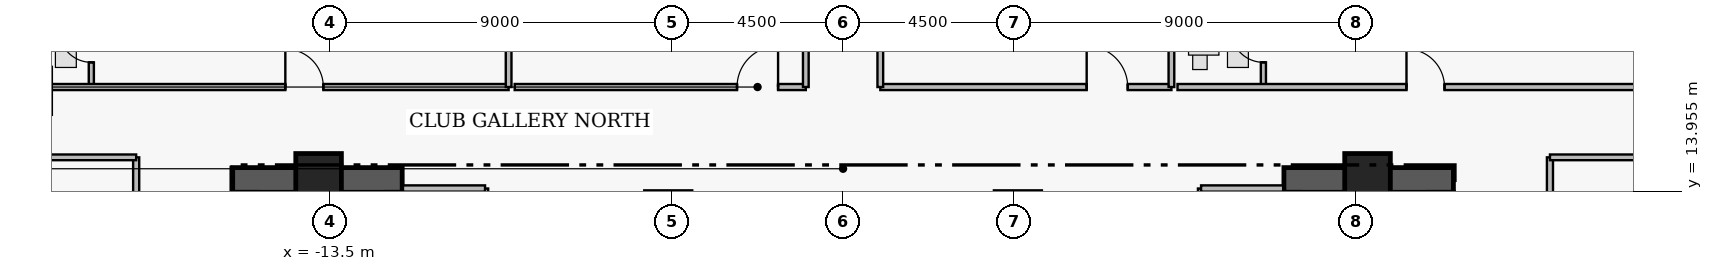
"""IFC4 building model, lengths in metres.
Left out: names, types, materials, properties, quantities, classifications, styles, units other than length and angle.
Written with IfcOpenShell. Run it as: python <this file> out.ifc"""

import sys

from ifc_helpers import new_model, si_unit, direction, frame, frame_2d, origin, origin_2d, place, context, subcontext, project, spatial, rectangle, extrude, element, fill, save


model = new_model("IFC4")
c1 = context("Model", 3, precision=1e-05, world=origin(), true_north=direction((0.0, 1.0)))
c2 = subcontext(c1, "Body", "Model", "MODEL_VIEW")
j1 = project(units=[si_unit("LENGTHUNIT", "METRE"), si_unit("PLANEANGLEUNIT", "RADIAN")], contexts=[c1])
p1 = place(None, origin())
s1 = spatial("IfcSite", under=j1, at=p1, CompositionType="ELEMENT")
p2 = place(p1, origin())
s2 = spatial("IfcBuilding", under=s1, at=p2, CompositionType="ELEMENT")
p3 = place(p2, frame((0.0, 0.0, 226.15)))
s3 = spatial("IfcBuildingStorey", under=s2, at=p3, CompositionType="ELEMENT", Elevation=226.15)
for number, where, z_axis, x_axis in (
    (1, (-16.06, 14.255, 0.0), (0.0, 0.0, 1.0), (1.0, 0.0, 0.0)),
    (2, (11.6, 14.255, 0.0), (0.0, 0.0, 1.0), (1.0, 0.0, 0.0)),
):
    element("IfcWall", number, at=place(p3, frame(where, z_axis=z_axis, x_axis=x_axis)), inside=s3, PredefinedType="SHEAR", context=c2, shape_type="SweptSolid", body=[
        extrude(rectangle(XDim=4.46, YDim=0.65, at=frame_2d((2.23, 0.0))), origin(), (0.0, 0.0, 1.0), 3.56),
    ])
for number, where, z_axis, x_axis in (
    (3, (-13.8, 14.35, 0.0), (0.0, 0.0, 1.0), (1.0, 0.0, 0.0)),
    (4, (-4.6, 13.35, 0.0), (0.0, 0.0, 1.0), (1.0, 0.0, 0.0)),
    (5, (4.6, 13.35, 0.0), (0.0, 0.0, 1.0), (1.0, 0.0, 0.0)),
    (6, (13.8, 14.35, 0.0), (0.0, 0.0, 1.0), (1.0, 0.0, 0.0)),
):
    element("IfcColumn", number, at=place(p3, frame(where, z_axis=z_axis, x_axis=x_axis)), inside=s3, PredefinedType="COLUMN", context=c2, shape_type="SweptSolid", body=[
        extrude(rectangle(XDim=1.2, YDim=1.2, at=origin_2d()), origin(), (0.0, 0.0, 1.0), 3.75),
    ])
p4 = place(p3, frame((-19.78, 16.7, 0.0), z_axis=(0.0, 0.0, 1.0), x_axis=(0.0, 1.0, 0.0)))
e7 = element("IfcWall", 7, at=p4, inside=s3, PredefinedType="PLUMBINGWALL", context=c2, shape_type="SweptSolid", body=[
    extrude(rectangle(XDim=2.36, YDim=0.135, at=frame_2d((1.18, 0.0))), origin(), (0.0, 0.0, 1.0), 3.53),
])
p5 = place(p4, frame((0.65, 0.0, 0.0)))
e8 = element("IfcOpeningElement", 8, at=p5, cuts=e7, PredefinedType="OPENING", context=c2, shape_type="SweptSolid", body=[
    extrude(rectangle(XDim=0.85, YDim=2.1, at=frame_2d((0.425, 1.05))), frame((0.0, 0.077, 0.0), z_axis=(0.0, -1.0, 0.0), x_axis=(1.0, 0.0, 0.0)), (0.0, 0.0, 1.0), 0.155),
])
p6 = place(p3, frame((-22.04, 16.7, 0.0), z_axis=(0.0, 0.0, 1.0), x_axis=(1.0, 0.0, 0.0)))
e9 = element("IfcWall", 9, at=p6, inside=s3, PredefinedType="PARTITIONING", context=c2, shape_type="SweptSolid", body=[
    extrude(rectangle(XDim=13.24, YDim=0.16, at=frame_2d((6.62, 0.0))), origin(), (0.0, 0.0, 1.0), 3.124),
])
p7 = place(p6, frame((7.365, 0.0, 0.0)))
e10 = element("IfcOpeningElement", 10, at=p7, cuts=e9, PredefinedType="OPENING", context=c2, shape_type="SweptSolid", body=[
    extrude(rectangle(XDim=1.0, YDim=2.15, at=frame_2d((0.5, 1.075))), frame((0.0, 0.09, 0.0), z_axis=(0.0, -1.0, 0.0), x_axis=(1.0, 0.0, 0.0)), (0.0, 0.0, 1.0), 0.18),
])
p8 = place(p3, frame((-8.64, 16.7, 0.0), z_axis=(0.0, 0.0, 1.0), x_axis=(1.0, 0.0, 0.0)))
e11 = element("IfcWall", 11, at=p8, inside=s3, PredefinedType="PARTITIONING", context=c2, shape_type="SweptSolid", body=[
    extrude(rectangle(XDim=7.66, YDim=0.16, at=frame_2d((3.83, 0.0))), origin(), (0.0, 0.0, 1.0), 3.124),
])
p9 = place(p8, frame((5.85, 0.0, 0.0)))
e12 = element("IfcOpeningElement", 12, at=p9, cuts=e11, PredefinedType="OPENING", context=c2, shape_type="SweptSolid", body=[
    extrude(rectangle(XDim=1.08, YDim=2.18, at=frame_2d((0.54, 1.09))), frame((0.0, 0.09, 0.0), z_axis=(0.0, -1.0, 0.0), x_axis=(1.0, 0.0, 0.0)), (0.0, 0.0, 1.0), 0.18),
])
p10 = place(p3, frame((0.98, 16.7, 0.0), z_axis=(0.0, 0.0, 1.0), x_axis=(1.0, 0.0, 0.0)))
e13 = element("IfcWall", 13, at=p10, inside=s3, PredefinedType="PARTITIONING", context=c2, shape_type="SweptSolid", body=[
    extrude(rectangle(XDim=7.66, YDim=0.16, at=frame_2d((3.83, 0.0))), origin(), (0.0, 0.0, 1.0), 3.124),
])
p11 = place(p10, frame((5.43, 0.0, 0.0)))
e14 = element("IfcOpeningElement", 14, at=p11, cuts=e13, PredefinedType="OPENING", context=c2, shape_type="SweptSolid", body=[
    extrude(rectangle(XDim=1.08, YDim=2.18, at=frame_2d((0.54, 1.09))), frame((0.0, 0.09, 0.0), z_axis=(0.0, -1.0, 0.0), x_axis=(1.0, 0.0, 0.0)), (0.0, 0.0, 1.0), 0.18),
])
p12 = place(p3, frame((11.06, 16.7, 0.0), z_axis=(0.0, 0.0, 1.0), x_axis=(0.0, 1.0, 0.0)))
e15 = element("IfcWall", 15, at=p12, inside=s3, PredefinedType="PLUMBINGWALL", context=c2, shape_type="SweptSolid", body=[
    extrude(rectangle(XDim=2.36, YDim=0.135, at=frame_2d((1.18, 0.0))), origin(), (0.0, 0.0, 1.0), 3.53),
])
p13 = place(p12, frame((0.65, 0.0, 0.0)))
e16 = element("IfcOpeningElement", 16, at=p13, cuts=e15, PredefinedType="OPENING", context=c2, shape_type="SweptSolid", body=[
    extrude(rectangle(XDim=0.85, YDim=2.1, at=frame_2d((0.425, 1.05))), frame((0.0, 0.077, 0.0), z_axis=(0.0, -1.0, 0.0), x_axis=(1.0, 0.0, 0.0)), (0.0, 0.0, 1.0), 0.155),
])
p14 = place(p3, frame((8.8, 16.7, 0.0), z_axis=(0.0, 0.0, 1.0), x_axis=(1.0, 0.0, 0.0)))
e17 = element("IfcWall", 17, at=p14, inside=s3, PredefinedType="PARTITIONING", context=c2, shape_type="SweptSolid", body=[
    extrude(rectangle(XDim=13.24, YDim=0.16, at=frame_2d((6.62, 0.0))), origin(), (0.0, 0.0, 1.0), 3.124),
])
p15 = place(p14, frame((6.025, 0.0, 0.0)))
e18 = element("IfcOpeningElement", 18, at=p15, cuts=e17, PredefinedType="OPENING", context=c2, shape_type="SweptSolid", body=[
    extrude(rectangle(XDim=1.0, YDim=2.15, at=frame_2d((0.5, 1.075))), frame((0.0, 0.09, 0.0), z_axis=(0.0, -1.0, 0.0), x_axis=(1.0, 0.0, 0.0)), (0.0, 0.0, 1.0), 0.18),
])
p16 = place(p3, frame((18.6, 7.96, 0.0), z_axis=(0.0, 0.0, 1.0), x_axis=(0.0, 1.0, 0.0)))
e19 = element("IfcWall", 19, at=p16, inside=s3, PredefinedType="PARTITIONING", context=c2, shape_type="SweptSolid", body=[
    extrude(rectangle(XDim=6.89, YDim=0.16, at=frame_2d((3.445, 0.0))), origin(), (0.0, 0.0, 1.0), 3.53),
])
p17 = place(p16, frame((2.985, 0.0, 0.0)))
e20 = element("IfcOpeningElement", 20, at=p17, cuts=e19, PredefinedType="OPENING", context=c2, shape_type="SweptSolid", body=[
    extrude(rectangle(XDim=0.92, YDim=2.12, at=frame_2d((0.46, 1.06))), frame((0.0, 0.09, 0.0), z_axis=(0.0, -1.0, 0.0), x_axis=(1.0, 0.0, 0.0)), (0.0, 0.0, 1.0), 0.18),
])
p18 = place(p3, frame((-18.6, 10.18, 0.0), z_axis=(0.0, 0.0, 1.0), x_axis=(0.0, 1.0, 0.0)))
e21 = element("IfcWall", 21, at=p18, inside=s3, PredefinedType="PARTITIONING", context=c2, shape_type="SweptSolid", body=[
    extrude(rectangle(XDim=4.67, YDim=0.16, at=frame_2d((2.335, 0.0))), origin(), (0.0, 0.0, 1.0), 3.53),
])
p19 = place(p18, frame((1.86, 0.0, 0.0)))
e22 = element("IfcOpeningElement", 22, at=p19, cuts=e21, PredefinedType="OPENING", context=c2, shape_type="SweptSolid", body=[
    extrude(rectangle(XDim=0.95, YDim=2.15, at=frame_2d((0.475, 1.075))), frame((0.0, 0.09, 0.0), z_axis=(0.0, -1.0, 0.0), x_axis=(1.0, 0.0, 0.0)), (0.0, 0.0, 1.0), 0.18),
])
p20 = place(p3, frame((-9.42, 11.07, 0.0), z_axis=(0.0, 0.0, 1.0), x_axis=(0.0, 1.0, 0.0)))
e23 = element("IfcWall", 23, at=p20, inside=s3, PredefinedType="PARTITIONING", context=c2, shape_type="SweptSolid", body=[
    extrude(rectangle(XDim=2.96, YDim=0.165, at=frame_2d((1.48, 0.0))), origin(), (0.0, 0.0, 1.0), 3.53),
])
p21 = place(p3, frame((-11.58, 14.03, 0.0), z_axis=(0.0, 0.0, 1.0), x_axis=(1.0, 0.0, 0.0)))
e24 = element("IfcWall", 24, at=p21, inside=s3, PredefinedType="PARTITIONING", context=c2, shape_type="SweptSolid", body=[
    extrude(rectangle(XDim=2.16, YDim=0.165, at=frame_2d((1.08, 0.0))), origin(), (0.0, 0.0, 1.0), 3.53),
])
p22 = place(p3, frame((9.42, 11.07, 0.0), z_axis=(0.0, 0.0, 1.0), x_axis=(0.0, 1.0, 0.0)))
e25 = element("IfcWall", 25, at=p22, inside=s3, PredefinedType="PARTITIONING", context=c2, shape_type="SweptSolid", body=[
    extrude(rectangle(XDim=2.96, YDim=0.165, at=frame_2d((1.48, 0.0))), origin(), (0.0, 0.0, 1.0), 3.53),
])
p23 = place(p3, frame((9.42, 14.03, 0.0), z_axis=(0.0, 0.0, 1.0), x_axis=(1.0, 0.0, 0.0)))
e26 = element("IfcWall", 26, at=p23, inside=s3, PredefinedType="PARTITIONING", context=c2, shape_type="SweptSolid", body=[
    extrude(rectangle(XDim=2.16, YDim=0.165, at=frame_2d((1.08, 0.0))), origin(), (0.0, 0.0, 1.0), 3.53),
])
for number, where, z_axis, x_axis in (
    (27, (-8.8, 16.7, 0.0), (0.0, 0.0, 1.0), (0.0, 1.0, 0.0)),
    (28, (-0.98, 16.7, 0.0), (0.0, 0.0, 1.0), (0.0, 1.0, 0.0)),
    (29, (0.98, 16.7, 0.0), (0.0, 0.0, 1.0), (0.0, 1.0, 0.0)),
    (30, (8.64, 16.7, 0.0), (0.0, 0.0, 1.0), (0.0, 1.0, 0.0)),
):
    element("IfcWall", number, at=place(p3, frame(where, z_axis=z_axis, x_axis=x_axis)), inside=s3, PredefinedType="PARTITIONING", context=c2, shape_type="SweptSolid", body=[
        extrude(rectangle(XDim=8.3, YDim=0.15, at=frame_2d((4.15, 0.0))), origin(), (0.0, 0.0, 1.0), 3.53),
    ])
for number, where, z_axis, x_axis in (
    (31, (18.6, 14.85, 0.0), (0.0, 0.0, 1.0), (1.0, 0.0, 0.0)),
    (32, (-23.638, 14.85, 0.0), (0.0, 0.0, 1.0), (1.0, 0.0, 0.0)),
):
    element("IfcWall", number, at=place(p3, frame(where, z_axis=z_axis, x_axis=x_axis)), inside=s3, PredefinedType="PARTITIONING", context=c2, shape_type="SweptSolid", body=[
        extrude(rectangle(XDim=5.038, YDim=0.15, at=frame_2d((2.519, 0.0))), origin(), (0.0, 0.0, 1.0), 3.53),
    ])
p24 = place(p5, origin())
e33 = element("IfcDoor", 33, at=p24, inside=s3, OperationType="SINGLE_SWING_RIGHT", PredefinedType="DOOR", context=c2, shape_type="SweptSolid", body=[
    extrude(rectangle(XDim=0.85, YDim=2.1, at=frame_2d((0.425, 1.05))), frame((0.0, 0.025, 0.0), z_axis=(0.0, -1.0, 0.0), x_axis=(1.0, 0.0, 0.0)), (0.0, 0.0, 1.0), 0.05),
])
fill(e8, e33)
p25 = place(p7, origin())
e34 = element("IfcDoor", 34, at=p25, inside=s3, OperationType="SINGLE_SWING_LEFT", PredefinedType="DOOR", context=c2, shape_type="SweptSolid", body=[
    extrude(rectangle(XDim=1.0, YDim=2.15, at=frame_2d((0.5, 1.075))), frame((0.0, 0.025, 0.0), z_axis=(0.0, -1.0, 0.0), x_axis=(1.0, 0.0, 0.0)), (0.0, 0.0, 1.0), 0.05),
])
fill(e10, e34)
p26 = place(p9, origin())
e35 = element("IfcDoor", 35, at=p26, inside=s3, OperationType="SINGLE_SWING_RIGHT", PredefinedType="DOOR", context=c2, shape_type="SweptSolid", body=[
    extrude(rectangle(XDim=1.08, YDim=2.18, at=frame_2d((0.54, 1.09))), frame((0.0, 0.025, 0.0), z_axis=(0.0, -1.0, 0.0), x_axis=(1.0, 0.0, 0.0)), (0.0, 0.0, 1.0), 0.05),
])
fill(e12, e35)
p27 = place(p11, origin())
e36 = element("IfcDoor", 36, at=p27, inside=s3, OperationType="SINGLE_SWING_LEFT", PredefinedType="DOOR", context=c2, shape_type="SweptSolid", body=[
    extrude(rectangle(XDim=1.08, YDim=2.18, at=frame_2d((0.54, 1.09))), frame((0.0, 0.025, 0.0), z_axis=(0.0, -1.0, 0.0), x_axis=(1.0, 0.0, 0.0)), (0.0, 0.0, 1.0), 0.05),
])
fill(e14, e36)
p28 = place(p13, origin())
e37 = element("IfcDoor", 37, at=p28, inside=s3, OperationType="SINGLE_SWING_RIGHT", PredefinedType="DOOR", context=c2, shape_type="SweptSolid", body=[
    extrude(rectangle(XDim=0.85, YDim=2.1, at=frame_2d((0.425, 1.05))), frame((0.0, 0.025, 0.0), z_axis=(0.0, -1.0, 0.0), x_axis=(1.0, 0.0, 0.0)), (0.0, 0.0, 1.0), 0.05),
])
fill(e16, e37)
p29 = place(p15, origin())
e38 = element("IfcDoor", 38, at=p29, inside=s3, OperationType="SINGLE_SWING_LEFT", PredefinedType="DOOR", context=c2, shape_type="SweptSolid", body=[
    extrude(rectangle(XDim=1.0, YDim=2.15, at=frame_2d((0.5, 1.075))), frame((0.0, 0.025, 0.0), z_axis=(0.0, -1.0, 0.0), x_axis=(1.0, 0.0, 0.0)), (0.0, 0.0, 1.0), 0.05),
])
fill(e18, e38)
save(model, sys.argv[1])
